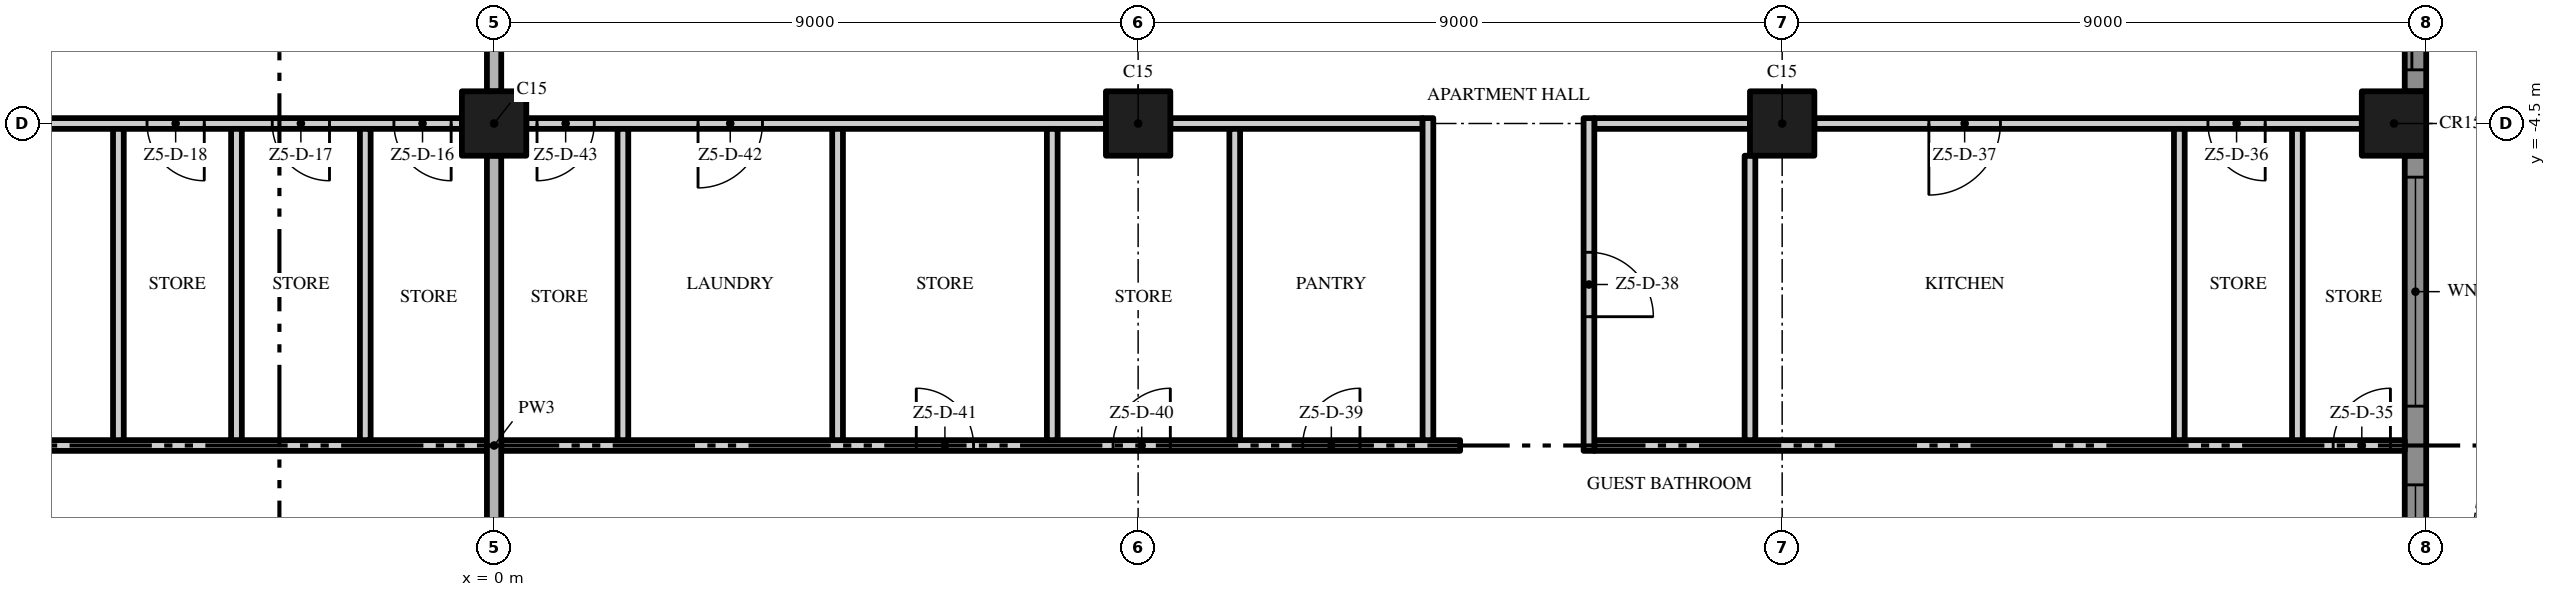
"""IFC4 building model, lengths in metres.
Left out: names, types, materials, properties, quantities, classifications, styles, units other than length and angle.
Written with IfcOpenShell. Run it as: python <this file> out.ifc"""

import sys

from ifc_helpers import new_model, si_unit, direction, frame, frame_2d, origin, origin_2d, place, context, subcontext, project, spatial, polyline, rectangle, outline, extrude, element, fill, save


model = new_model("IFC4")
c1 = context("Model", 3, precision=1e-05, world=origin(), true_north=direction((0.0, 1.0)))
c2 = subcontext(c1, "Body", "Model", "MODEL_VIEW")
j1 = project(units=[si_unit("LENGTHUNIT", "METRE"), si_unit("PLANEANGLEUNIT", "RADIAN")], contexts=[c1])
p1 = place(None, origin())
s1 = spatial("IfcSite", under=j1, at=p1, CompositionType="ELEMENT")
p2 = place(p1, origin())
s2 = spatial("IfcBuilding", under=s1, at=p2, CompositionType="ELEMENT")
p3 = place(p2, frame((0.0, 0.0, 280.6)))
s3 = spatial("IfcBuildingStorey", under=s2, at=p3, CompositionType="ELEMENT", Elevation=280.6)
for number, where, z_axis, x_axis in (
    (1, (0.0, -4.5, 0.0), (0.0, 0.0, 1.0), (1.0, 0.0, 0.0)),
    (2, (18.0, -4.5, 0.0), (0.0, 0.0, 1.0), (1.0, 0.0, 0.0)),
    (3, (26.55, -4.5, 0.0), (0.0, 0.0, 1.0), (1.0, 0.0, 0.0)),
    (4, (9.0, -4.5, 0.0), (0.0, 0.0, 1.0), (1.0, 0.0, 0.0)),
):
    element("IfcColumn", number, at=place(p3, frame(where, z_axis=z_axis, x_axis=x_axis)), inside=s3, PredefinedType="COLUMN", context=c2, shape_type="SweptSolid", body=[
        extrude(rectangle(XDim=0.9, YDim=0.9, at=origin_2d()), origin(), (0.0, 0.0, 1.0), 3.5),
    ])
p4 = place(p3, frame((26.85, -4.95, 0.0), z_axis=(0.0, 0.0, 1.0), x_axis=(0.0, -1.0, 0.0)))
e5 = element("IfcWall", 5, at=p4, inside=s3, PredefinedType="SOLIDWALL", context=c2, shape_type="SweptSolid", body=[
    extrude(rectangle(XDim=8.1, YDim=0.3, at=frame_2d((4.05, 0.0))), origin(), (0.0, 0.0, 1.0), 3.5),
])
p5 = place(p4, frame((4.6, 0.0, 0.45)))
e6 = element("IfcOpeningElement", 6, at=p5, cuts=e5, PredefinedType="OPENING", context=c2, shape_type="SweptSolid", body=[
    extrude(rectangle(XDim=3.2, YDim=2.65, at=frame_2d((1.6, 1.325))), frame((0.0, 0.16, 0.0), z_axis=(0.0, -1.0, 0.0), x_axis=(1.0, 0.0, 0.0)), (0.0, 0.0, 1.0), 0.32),
])
p6 = place(p4, frame((0.3, 0.0, 0.45)))
e7 = element("IfcOpeningElement", 7, at=p6, cuts=e5, PredefinedType="OPENING", context=c2, shape_type="SweptSolid", body=[
    extrude(rectangle(XDim=3.2, YDim=2.65, at=frame_2d((1.6, 1.325))), frame((0.0, 0.16, 0.0), z_axis=(0.0, -1.0, 0.0), x_axis=(1.0, 0.0, 0.0)), (0.0, 0.0, 1.0), 0.32),
])
p7 = place(p3, frame((26.85, 4.05, 0.0), z_axis=(0.0, 0.0, 1.0), x_axis=(0.0, -1.0, 0.0)))
e8 = element("IfcWall", 8, at=p7, inside=s3, PredefinedType="SOLIDWALL", context=c2, shape_type="SweptSolid", body=[
    extrude(rectangle(XDim=8.1, YDim=0.3, at=frame_2d((4.05, 0.0))), origin(), (0.0, 0.0, 1.0), 3.5),
])
p8 = place(p7, frame((4.6, 0.0, 0.0)))
e9 = element("IfcOpeningElement", 9, at=p8, cuts=e8, PredefinedType="OPENING", context=c2, shape_type="SweptSolid", body=[
    extrude(rectangle(XDim=3.2, YDim=2.4, at=frame_2d((1.6, 1.2))), frame((0.0, 0.16, 0.0), z_axis=(0.0, -1.0, 0.0), x_axis=(1.0, 0.0, 0.0)), (0.0, 0.0, 1.0), 0.32),
])
p9 = place(p7, frame((0.3, 0.0, 0.45)))
e10 = element("IfcOpeningElement", 10, at=p9, cuts=e8, PredefinedType="OPENING", context=c2, shape_type="SweptSolid", body=[
    extrude(rectangle(XDim=3.2, YDim=2.65, at=frame_2d((1.6, 1.325))), frame((0.0, 0.16, 0.0), z_axis=(0.0, -1.0, 0.0), x_axis=(1.0, 0.0, 0.0)), (0.0, 0.0, 1.0), 0.32),
])
p10 = place(p3, origin())
e11 = element("IfcWall", 11, at=p10, inside=s3, PredefinedType="USERDEFINED", context=c2, shape_type="SweptSolid", body=[
    extrude(outline(polyline([(30.0, -18.0), (29.771, -16.5), (29.171, -15.0), (28.429, -13.5), (27.829, -12.0), (27.6, -10.5), (27.829, -9.0), (28.429, -7.5), (29.171, -6.0), (29.771, -4.5), (30.0, -3.0), (29.771, -1.5), (29.171, 0.0), (28.429, 1.5), (27.829, 3.0), (27.6, 4.5), (27.829, 6.0), (28.429, 7.5), (29.171, 9.0), (29.771, 10.5), (30.0, 12.0), (29.771, 13.5), (29.171, 15.0), (28.429, 16.5), (27.829, 18.0), (27.597, 17.907), (28.201, 16.398), (28.942, 14.898), (29.528, 13.434), (29.747, 12.0), (29.528, 10.566), (28.942, 9.102), (28.201, 7.602), (27.586, 6.066), (27.347, 4.5), (27.586, 2.934), (28.201, 1.398), (28.942, -0.102), (29.528, -1.566), (29.747, -3.0), (29.528, -4.434), (28.942, -5.898), (28.201, -7.398), (27.586, -8.934), (27.347, -10.5), (27.586, -12.066), (28.201, -13.602), (28.942, -15.102), (29.528, -16.566), (29.753, -18.038), (30.0, -18.0)])), origin(), (0.0, 0.0, 1.0), 0.9),
])
p11 = place(p3, frame((-13.425, -9.0, 0.0), z_axis=(0.0, 0.0, 1.0), x_axis=(1.0, 0.0, 0.0)))
e12 = element("IfcWall", 12, at=p11, inside=s3, PredefinedType="PARTITIONING", context=c2, shape_type="SweptSolid", body=[
    extrude(rectangle(XDim=13.325, YDim=0.15, at=frame_2d((6.662, 0.0))), origin(), (0.0, 0.0, 1.0), 3.5),
])
p12 = place(p11, frame((4.675, 0.0, 0.0)))
e13 = element("IfcOpeningElement", 13, at=p12, cuts=e12, PredefinedType="OPENING", context=c2, shape_type="SweptSolid", body=[
    extrude(rectangle(XDim=1.0, YDim=2.4, at=frame_2d((0.5, 1.2))), frame((0.0, 0.085, 0.0), z_axis=(0.0, -1.0, 0.0), x_axis=(1.0, 0.0, 0.0)), (0.0, 0.0, 1.0), 0.17),
])
p13 = place(p3, frame((0.1, -9.0, 0.0), z_axis=(0.0, 0.0, 1.0), x_axis=(1.0, 0.0, 0.0)))
e14 = element("IfcWall", 14, at=p13, inside=s3, PredefinedType="PARTITIONING", context=c2, shape_type="SweptSolid", body=[
    extrude(rectangle(XDim=13.4, YDim=0.15, at=frame_2d((6.7, 0.0))), origin(), (0.0, 0.0, 1.0), 3.5),
])
p14 = place(p13, frame((11.2, 0.0, 0.0)))
e15 = element("IfcOpeningElement", 15, at=p14, cuts=e14, PredefinedType="OPENING", context=c2, shape_type="SweptSolid", body=[
    extrude(rectangle(XDim=0.8, YDim=2.0, at=frame_2d((0.4, 1.0))), frame((0.0, 0.085, 0.0), z_axis=(0.0, -1.0, 0.0), x_axis=(1.0, 0.0, 0.0)), (0.0, 0.0, 1.0), 0.17),
])
p15 = place(p13, frame((8.55, 0.0, 0.0)))
e16 = element("IfcOpeningElement", 16, at=p15, cuts=e14, PredefinedType="OPENING", context=c2, shape_type="SweptSolid", body=[
    extrude(rectangle(XDim=0.8, YDim=2.0, at=frame_2d((0.4, 1.0))), frame((0.0, 0.085, 0.0), z_axis=(0.0, -1.0, 0.0), x_axis=(1.0, 0.0, 0.0)), (0.0, 0.0, 1.0), 0.17),
])
p16 = place(p13, frame((5.8, 0.0, 0.0)))
e17 = element("IfcOpeningElement", 17, at=p16, cuts=e14, PredefinedType="OPENING", context=c2, shape_type="SweptSolid", body=[
    extrude(rectangle(XDim=0.8, YDim=2.0, at=frame_2d((0.4, 1.0))), frame((0.0, 0.085, 0.0), z_axis=(0.0, -1.0, 0.0), x_axis=(1.0, 0.0, 0.0)), (0.0, 0.0, 1.0), 0.17),
])
p17 = place(p3, frame((15.375, -9.0, 0.0), z_axis=(0.0, 0.0, 1.0), x_axis=(1.0, 0.0, 0.0)))
e18 = element("IfcWall", 18, at=p17, inside=s3, PredefinedType="PARTITIONING", context=c2, shape_type="SweptSolid", body=[
    extrude(rectangle(XDim=11.325, YDim=0.15, at=frame_2d((5.662, 0.0))), origin(), (0.0, 0.0, 1.0), 3.5),
])
p18 = place(p17, frame((10.325, 0.0, 0.0)))
e19 = element("IfcOpeningElement", 19, at=p18, cuts=e18, PredefinedType="OPENING", context=c2, shape_type="SweptSolid", body=[
    extrude(rectangle(XDim=0.8, YDim=2.0, at=frame_2d((0.4, 1.0))), frame((0.0, 0.085, 0.0), z_axis=(0.0, -1.0, 0.0), x_axis=(1.0, 0.0, 0.0)), (0.0, 0.0, 1.0), 0.17),
])
p19 = place(p3, frame((-0.45, -4.5, 0.0), z_axis=(0.0, 0.0, 1.0), x_axis=(-1.0, 0.0, 0.0)))
e20 = element("IfcWall", 20, at=p19, inside=s3, PredefinedType="PARTITIONING", context=c2, shape_type="SweptSolid", body=[
    extrude(rectangle(XDim=8.1, YDim=0.15, at=frame_2d((4.05, 0.0))), origin(), (0.0, 0.0, 1.0), 3.5),
])
p20 = place(p19, frame((0.15, 0.0, 0.0)))
e21 = element("IfcOpeningElement", 21, at=p20, cuts=e20, PredefinedType="OPENING", context=c2, shape_type="SweptSolid", body=[
    extrude(rectangle(XDim=0.8, YDim=2.0, at=frame_2d((0.4, 1.0))), frame((0.0, 0.085, 0.0), z_axis=(0.0, -1.0, 0.0), x_axis=(1.0, 0.0, 0.0)), (0.0, 0.0, 1.0), 0.17),
])
p21 = place(p19, frame((1.85, 0.0, 0.0)))
e22 = element("IfcOpeningElement", 22, at=p21, cuts=e20, PredefinedType="OPENING", context=c2, shape_type="SweptSolid", body=[
    extrude(rectangle(XDim=0.8, YDim=2.0, at=frame_2d((0.4, 1.0))), frame((0.0, 0.085, 0.0), z_axis=(0.0, -1.0, 0.0), x_axis=(1.0, 0.0, 0.0)), (0.0, 0.0, 1.0), 0.17),
])
p22 = place(p19, frame((3.6, 0.0, 0.0)))
e23 = element("IfcOpeningElement", 23, at=p22, cuts=e20, PredefinedType="OPENING", context=c2, shape_type="SweptSolid", body=[
    extrude(rectangle(XDim=0.8, YDim=2.0, at=frame_2d((0.4, 1.0))), frame((0.0, 0.085, 0.0), z_axis=(0.0, -1.0, 0.0), x_axis=(1.0, 0.0, 0.0)), (0.0, 0.0, 1.0), 0.17),
])
p23 = place(p3, frame((8.55, -4.5, 0.0), z_axis=(0.0, 0.0, 1.0), x_axis=(-1.0, 0.0, 0.0)))
e24 = element("IfcWall", 24, at=p23, inside=s3, PredefinedType="PARTITIONING", context=c2, shape_type="SweptSolid", body=[
    extrude(rectangle(XDim=8.1, YDim=0.15, at=frame_2d((4.05, 0.0))), origin(), (0.0, 0.0, 1.0), 3.5),
])
p24 = place(p23, frame((4.8, 0.0, 0.0)))
e25 = element("IfcOpeningElement", 25, at=p24, cuts=e24, PredefinedType="OPENING", context=c2, shape_type="SweptSolid", body=[
    extrude(rectangle(XDim=0.9, YDim=2.1, at=frame_2d((0.45, 1.05))), frame((0.0, 0.085, 0.0), z_axis=(0.0, -1.0, 0.0), x_axis=(1.0, 0.0, 0.0)), (0.0, 0.0, 1.0), 0.17),
])
p25 = place(p23, frame((7.15, 0.0, 0.0)))
e26 = element("IfcOpeningElement", 26, at=p25, cuts=e24, PredefinedType="OPENING", context=c2, shape_type="SweptSolid", body=[
    extrude(rectangle(XDim=0.8, YDim=2.0, at=frame_2d((0.4, 1.0))), frame((0.0, 0.085, 0.0), z_axis=(0.0, -1.0, 0.0), x_axis=(1.0, 0.0, 0.0)), (0.0, 0.0, 1.0), 0.17),
])
p26 = place(p3, frame((9.45, -4.5, 0.0), z_axis=(0.0, 0.0, 1.0), x_axis=(1.0, 0.0, 0.0)))
e27 = element("IfcWall", 27, at=p26, inside=s3, PredefinedType="PARTITIONING", context=c2, shape_type="SweptSolid", body=[
    extrude(rectangle(XDim=3.525, YDim=0.15, at=frame_2d((1.762, 0.0))), origin(), (0.0, 0.0, 1.0), 3.5),
])
p27 = place(p3, frame((15.375, -4.5, 0.0), z_axis=(0.0, 0.0, 1.0), x_axis=(1.0, 0.0, 0.0)))
e28 = element("IfcWall", 28, at=p27, inside=s3, PredefinedType="PARTITIONING", context=c2, shape_type="SweptSolid", body=[
    extrude(rectangle(XDim=2.175, YDim=0.15, at=frame_2d((1.087, 0.0))), origin(), (0.0, 0.0, 1.0), 3.5),
])
p28 = place(p3, frame((26.1, -4.5, 0.0), z_axis=(0.0, 0.0, 1.0), x_axis=(-1.0, 0.0, 0.0)))
e29 = element("IfcWall", 29, at=p28, inside=s3, PredefinedType="PARTITIONING", context=c2, shape_type="SweptSolid", body=[
    extrude(rectangle(XDim=7.65, YDim=0.15, at=frame_2d((3.825, 0.0))), origin(), (0.0, 0.0, 1.0), 3.5),
])
p29 = place(p28, frame((1.35, 0.0, 0.0)))
e30 = element("IfcOpeningElement", 30, at=p29, cuts=e29, PredefinedType="OPENING", context=c2, shape_type="SweptSolid", body=[
    extrude(rectangle(XDim=0.8, YDim=2.0, at=frame_2d((0.4, 1.0))), frame((0.0, 0.085, 0.0), z_axis=(0.0, -1.0, 0.0), x_axis=(1.0, 0.0, 0.0)), (0.0, 0.0, 1.0), 0.17),
])
p30 = place(p28, frame((5.05, 0.0, 0.0)))
e31 = element("IfcOpeningElement", 31, at=p30, cuts=e29, PredefinedType="OPENING", context=c2, shape_type="SweptSolid", body=[
    extrude(rectangle(XDim=1.0, YDim=2.4, at=frame_2d((0.5, 1.2))), frame((0.0, 0.085, 0.0), z_axis=(0.0, -1.0, 0.0), x_axis=(1.0, 0.0, 0.0)), (0.0, 0.0, 1.0), 0.17),
])
for number, where, z_axis, x_axis in (
    (32, (-5.25, -8.925, 0.0), (0.0, 0.0, 1.0), (0.0, 1.0, 0.0)),
    (33, (-3.6, -8.925, 0.0), (0.0, 0.0, 1.0), (0.0, 1.0, 0.0)),
    (34, (-1.8, -8.925, 0.0), (0.0, 0.0, 1.0), (0.0, 1.0, 0.0)),
):
    element("IfcWall", number, at=place(p3, frame(where, z_axis=z_axis, x_axis=x_axis)), inside=s3, PredefinedType="PARTITIONING", context=c2, shape_type="SweptSolid", body=[
        extrude(rectangle(XDim=4.35, YDim=0.15, at=frame_2d((2.175, 0.0))), origin(), (0.0, 0.0, 1.0), 3.5),
    ])
p31 = place(p3, frame((0.0, -13.05, 0.0), z_axis=(0.0, 0.0, 1.0), x_axis=(0.0, 1.0, 0.0)))
e35 = element("IfcWall", 35, at=p31, inside=s3, PredefinedType="PARTITIONING", context=c2, shape_type="SweptSolid", body=[
    extrude(rectangle(XDim=8.1, YDim=0.2, at=frame_2d((4.05, 0.0))), origin(), (0.0, 0.0, 1.0), 3.5),
])
p32 = place(p3, frame((0.0, -4.05, 0.0), z_axis=(0.0, 0.0, 1.0), x_axis=(0.0, 1.0, 0.0)))
e36 = element("IfcWall", 36, at=p32, inside=s3, PredefinedType="PARTITIONING", context=c2, shape_type="SweptSolid", body=[
    extrude(rectangle(XDim=3.95, YDim=0.2, at=frame_2d((1.975, 0.0))), origin(), (0.0, 0.0, 1.0), 3.5),
])
for number, where, z_axis, x_axis in (
    (37, (1.8, -8.925, 0.0), (0.0, 0.0, 1.0), (0.0, 1.0, 0.0)),
    (38, (4.8, -8.925, 0.0), (0.0, 0.0, 1.0), (0.0, 1.0, 0.0)),
    (39, (7.8, -8.925, 0.0), (0.0, 0.0, 1.0), (0.0, 1.0, 0.0)),
    (40, (10.35, -8.925, 0.0), (0.0, 0.0, 1.0), (0.0, 1.0, 0.0)),
):
    element("IfcWall", number, at=place(p3, frame(where, z_axis=z_axis, x_axis=x_axis)), inside=s3, PredefinedType="PARTITIONING", context=c2, shape_type="SweptSolid", body=[
        extrude(rectangle(XDim=4.35, YDim=0.15, at=frame_2d((2.175, 0.0))), origin(), (0.0, 0.0, 1.0), 3.5),
    ])
p33 = place(p3, frame((13.05, -8.925, 0.0), z_axis=(0.0, 0.0, 1.0), x_axis=(0.0, 1.0, 0.0)))
e41 = element("IfcWall", 41, at=p33, inside=s3, PredefinedType="PARTITIONING", context=c2, shape_type="SweptSolid", body=[
    extrude(rectangle(XDim=4.5, YDim=0.15, at=frame_2d((2.25, 0.0))), origin(), (0.0, 0.0, 1.0), 3.5),
])
p34 = place(p3, frame((15.3, -4.425, 0.0), z_axis=(0.0, 0.0, 1.0), x_axis=(0.0, -1.0, 0.0)))
e42 = element("IfcWall", 42, at=p34, inside=s3, PredefinedType="PARTITIONING", context=c2, shape_type="SweptSolid", body=[
    extrude(rectangle(XDim=4.65, YDim=0.15, at=frame_2d((2.325, 0.0))), origin(), (0.0, 0.0, 1.0), 3.5),
])
p35 = place(p34, frame((1.875, 0.0, 0.0)))
e43 = element("IfcOpeningElement", 43, at=p35, cuts=e42, PredefinedType="OPENING", context=c2, shape_type="SweptSolid", body=[
    extrude(rectangle(XDim=0.9, YDim=2.1, at=frame_2d((0.45, 1.05))), frame((0.0, 0.085, 0.0), z_axis=(0.0, -1.0, 0.0), x_axis=(1.0, 0.0, 0.0)), (0.0, 0.0, 1.0), 0.17),
])
p36 = place(p3, frame((17.55, -8.925, 0.0), z_axis=(0.0, 0.0, 1.0), x_axis=(0.0, 1.0, 0.0)))
e44 = element("IfcWall", 44, at=p36, inside=s3, PredefinedType="PARTITIONING", context=c2, shape_type="SweptSolid", body=[
    extrude(rectangle(XDim=3.975, YDim=0.15, at=frame_2d((1.988, 0.0))), origin(), (0.0, 0.0, 1.0), 3.5),
])
for number, where, z_axis, x_axis in (
    (45, (23.55, -8.925, 0.0), (0.0, 0.0, 1.0), (0.0, 1.0, 0.0)),
    (46, (25.2, -8.925, 0.0), (0.0, 0.0, 1.0), (0.0, 1.0, 0.0)),
):
    element("IfcWall", number, at=place(p3, frame(where, z_axis=z_axis, x_axis=x_axis)), inside=s3, PredefinedType="PARTITIONING", context=c2, shape_type="SweptSolid", body=[
        extrude(rectangle(XDim=4.35, YDim=0.15, at=frame_2d((2.175, 0.0))), origin(), (0.0, 0.0, 1.0), 3.5),
    ])
p37 = place(p5, origin())
e47 = element("IfcWindow", 47, at=p37, inside=s3, PartitioningType="SINGLE_PANEL", PredefinedType="WINDOW", context=c2, shape_type="SweptSolid", body=[
    extrude(rectangle(XDim=3.2, YDim=2.65, at=frame_2d((1.6, 1.325))), frame((0.0, 0.03, 0.0), z_axis=(0.0, -1.0, 0.0), x_axis=(1.0, 0.0, 0.0)), (0.0, 0.0, 1.0), 0.06),
])
fill(e6, e47)
p38 = place(p6, origin())
e48 = element("IfcWindow", 48, at=p38, inside=s3, PartitioningType="SINGLE_PANEL", PredefinedType="WINDOW", context=c2, shape_type="SweptSolid", body=[
    extrude(rectangle(XDim=3.2, YDim=2.65, at=frame_2d((1.6, 1.325))), frame((0.0, 0.03, 0.0), z_axis=(0.0, -1.0, 0.0), x_axis=(1.0, 0.0, 0.0)), (0.0, 0.0, 1.0), 0.06),
])
fill(e7, e48)
p39 = place(p8, origin())
e49 = element("IfcDoor", 49, at=p39, inside=s3, OperationType="SINGLE_SWING_LEFT", PredefinedType="DOOR", context=c2, shape_type="SweptSolid", body=[
    extrude(rectangle(XDim=3.2, YDim=2.4, at=frame_2d((1.6, 1.2))), frame((0.0, 0.025, 0.0), z_axis=(0.0, -1.0, 0.0), x_axis=(1.0, 0.0, 0.0)), (0.0, 0.0, 1.0), 0.05),
])
fill(e9, e49)
p40 = place(p20, origin())
e50 = element("IfcDoor", 50, at=p40, inside=s3, OperationType="SINGLE_SWING_LEFT", PredefinedType="DOOR", context=c2, shape_type="SweptSolid", body=[
    extrude(rectangle(XDim=0.8, YDim=2.0, at=frame_2d((0.4, 1.0))), frame((0.0, 0.025, 0.0), z_axis=(0.0, -1.0, 0.0), x_axis=(1.0, 0.0, 0.0)), (0.0, 0.0, 1.0), 0.05),
])
fill(e21, e50)
p41 = place(p21, origin())
e51 = element("IfcDoor", 51, at=p41, inside=s3, OperationType="SINGLE_SWING_LEFT", PredefinedType="DOOR", context=c2, shape_type="SweptSolid", body=[
    extrude(rectangle(XDim=0.8, YDim=2.0, at=frame_2d((0.4, 1.0))), frame((0.0, 0.025, 0.0), z_axis=(0.0, -1.0, 0.0), x_axis=(1.0, 0.0, 0.0)), (0.0, 0.0, 1.0), 0.05),
])
fill(e22, e51)
p42 = place(p22, origin())
e52 = element("IfcDoor", 52, at=p42, inside=s3, OperationType="SINGLE_SWING_LEFT", PredefinedType="DOOR", context=c2, shape_type="SweptSolid", body=[
    extrude(rectangle(XDim=0.8, YDim=2.0, at=frame_2d((0.4, 1.0))), frame((0.0, 0.025, 0.0), z_axis=(0.0, -1.0, 0.0), x_axis=(1.0, 0.0, 0.0)), (0.0, 0.0, 1.0), 0.05),
])
fill(e23, e52)
p43 = place(p18, origin())
e53 = element("IfcDoor", 53, at=p43, inside=s3, OperationType="SINGLE_SWING_RIGHT", PredefinedType="DOOR", context=c2, shape_type="SweptSolid", body=[
    extrude(rectangle(XDim=0.8, YDim=2.0, at=frame_2d((0.4, 1.0))), frame((0.0, 0.025, 0.0), z_axis=(0.0, -1.0, 0.0), x_axis=(1.0, 0.0, 0.0)), (0.0, 0.0, 1.0), 0.05),
])
fill(e19, e53)
p44 = place(p29, origin())
e54 = element("IfcDoor", 54, at=p44, inside=s3, OperationType="SINGLE_SWING_LEFT", PredefinedType="DOOR", context=c2, shape_type="SweptSolid", body=[
    extrude(rectangle(XDim=0.8, YDim=2.0, at=frame_2d((0.4, 1.0))), frame((0.0, 0.025, 0.0), z_axis=(0.0, -1.0, 0.0), x_axis=(1.0, 0.0, 0.0)), (0.0, 0.0, 1.0), 0.05),
])
fill(e30, e54)
p45 = place(p30, origin())
e55 = element("IfcDoor", 55, at=p45, inside=s3, OperationType="SINGLE_SWING_RIGHT", PredefinedType="DOOR", context=c2, shape_type="SweptSolid", body=[
    extrude(rectangle(XDim=1.0, YDim=2.4, at=frame_2d((0.5, 1.2))), frame((0.0, 0.025, 0.0), z_axis=(0.0, -1.0, 0.0), x_axis=(1.0, 0.0, 0.0)), (0.0, 0.0, 1.0), 0.05),
])
fill(e31, e55)
p46 = place(p35, origin())
e56 = element("IfcDoor", 56, at=p46, inside=s3, OperationType="SINGLE_SWING_RIGHT", PredefinedType="DOOR", context=c2, shape_type="SweptSolid", body=[
    extrude(rectangle(XDim=0.9, YDim=2.1, at=frame_2d((0.45, 1.05))), frame((0.0, 0.025, 0.0), z_axis=(0.0, -1.0, 0.0), x_axis=(1.0, 0.0, 0.0)), (0.0, 0.0, 1.0), 0.05),
])
fill(e43, e56)
p47 = place(p14, origin())
e57 = element("IfcDoor", 57, at=p47, inside=s3, OperationType="SINGLE_SWING_RIGHT", PredefinedType="DOOR", context=c2, shape_type="SweptSolid", body=[
    extrude(rectangle(XDim=0.8, YDim=2.0, at=frame_2d((0.4, 1.0))), frame((0.0, 0.025, 0.0), z_axis=(0.0, -1.0, 0.0), x_axis=(1.0, 0.0, 0.0)), (0.0, 0.0, 1.0), 0.05),
])
fill(e15, e57)
p48 = place(p15, origin())
e58 = element("IfcDoor", 58, at=p48, inside=s3, OperationType="SINGLE_SWING_RIGHT", PredefinedType="DOOR", context=c2, shape_type="SweptSolid", body=[
    extrude(rectangle(XDim=0.8, YDim=2.0, at=frame_2d((0.4, 1.0))), frame((0.0, 0.025, 0.0), z_axis=(0.0, -1.0, 0.0), x_axis=(1.0, 0.0, 0.0)), (0.0, 0.0, 1.0), 0.05),
])
fill(e16, e58)
p49 = place(p16, origin())
e59 = element("IfcDoor", 59, at=p49, inside=s3, OperationType="SINGLE_SWING_LEFT", PredefinedType="DOOR", context=c2, shape_type="SweptSolid", body=[
    extrude(rectangle(XDim=0.8, YDim=2.0, at=frame_2d((0.4, 1.0))), frame((0.0, 0.025, 0.0), z_axis=(0.0, -1.0, 0.0), x_axis=(1.0, 0.0, 0.0)), (0.0, 0.0, 1.0), 0.05),
])
fill(e17, e59)
p50 = place(p24, origin())
e60 = element("IfcDoor", 60, at=p50, inside=s3, OperationType="SINGLE_SWING_RIGHT", PredefinedType="DOOR", context=c2, shape_type="SweptSolid", body=[
    extrude(rectangle(XDim=0.9, YDim=2.1, at=frame_2d((0.45, 1.05))), frame((0.0, 0.025, 0.0), z_axis=(0.0, -1.0, 0.0), x_axis=(1.0, 0.0, 0.0)), (0.0, 0.0, 1.0), 0.05),
])
fill(e25, e60)
p51 = place(p25, origin())
e61 = element("IfcDoor", 61, at=p51, inside=s3, OperationType="SINGLE_SWING_RIGHT", PredefinedType="DOOR", context=c2, shape_type="SweptSolid", body=[
    extrude(rectangle(XDim=0.8, YDim=2.0, at=frame_2d((0.4, 1.0))), frame((0.0, 0.025, 0.0), z_axis=(0.0, -1.0, 0.0), x_axis=(1.0, 0.0, 0.0)), (0.0, 0.0, 1.0), 0.05),
])
fill(e26, e61)
save(model, sys.argv[1])
